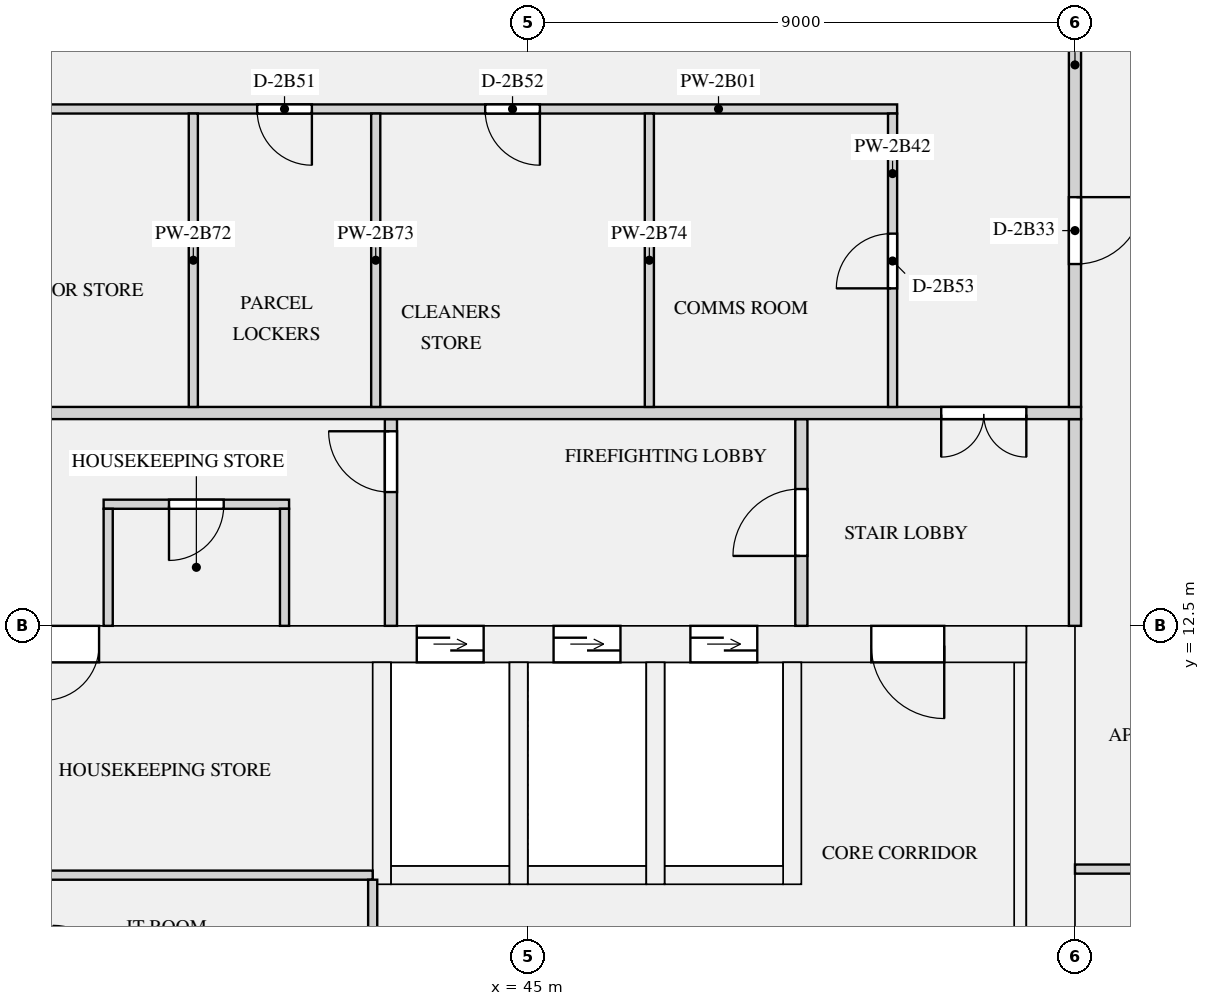
"""IFC4 building model, lengths in metres.
Left out: names, types, materials, properties, quantities, classifications, styles, units other than length and angle.
Written with IfcOpenShell. Run it as: python <this file> out.ifc"""

import sys

from ifc_helpers import new_model, si_unit, direction, frame, frame_2d, origin, place, context, subcontext, project, spatial, rectangle, extrude, element, fill, save


model = new_model("IFC4")
c1 = context("Model", 3, precision=1e-05, world=origin(), true_north=direction((0.0, 1.0)))
c2 = subcontext(c1, "Body", "Model", "MODEL_VIEW")
j1 = project(units=[si_unit("LENGTHUNIT", "METRE"), si_unit("PLANEANGLEUNIT", "RADIAN")], contexts=[c1])
p1 = place(None, origin())
s1 = spatial("IfcSite", under=j1, at=p1, CompositionType="ELEMENT")
p2 = place(p1, origin())
s2 = spatial("IfcBuilding", under=s1, at=p2, CompositionType="ELEMENT")
p3 = place(p2, frame((0.0, 0.0, 93.0)))
s3 = spatial("IfcBuildingStorey", under=s2, at=p3, CompositionType="ELEMENT", Elevation=93.0)
p4 = place(p3, frame((53.6, 0.0, 0.0), z_axis=(0.0, 0.0, 1.0), x_axis=(0.0, 1.0, 0.0)))
e1 = element("IfcWall", 1, at=p4, inside=s3, PredefinedType="SHEAR", context=c2, shape_type="SweptSolid", body=[
    extrude(rectangle(XDim=12.5, YDim=0.8, at=frame_2d((6.25, 0.0))), origin(), (0.0, 0.0, 1.0), 3.15),
])
p5 = place(p3, frame((18.8, 12.2, 0.0), z_axis=(0.0, 0.0, 1.0), x_axis=(1.0, 0.0, 0.0)))
e2 = element("IfcWall", 2, at=p5, inside=s3, PredefinedType="SHEAR", context=c2, shape_type="SweptSolid", body=[
    extrude(rectangle(XDim=34.4, YDim=0.6, at=frame_2d((17.2, 0.0))), origin(), (0.0, 0.0, 1.0), 3.15),
])
p6 = place(p5, frame((24.375, 0.0, 0.0)))
e3 = element("IfcOpeningElement", 3, at=p6, cuts=e2, PredefinedType="OPENING", context=c2, shape_type="SweptSolid", body=[
    extrude(rectangle(XDim=1.1, YDim=2.1, at=frame_2d((0.55, 1.05))), frame((0.0, 0.31, 0.0), z_axis=(0.0, -1.0, 0.0), x_axis=(1.0, 0.0, 0.0)), (0.0, 0.0, 1.0), 0.62),
])
p7 = place(p5, frame((26.625, 0.0, 0.0)))
e4 = element("IfcOpeningElement", 4, at=p7, cuts=e2, PredefinedType="OPENING", context=c2, shape_type="SweptSolid", body=[
    extrude(rectangle(XDim=1.1, YDim=2.1, at=frame_2d((0.55, 1.05))), frame((0.0, 0.31, 0.0), z_axis=(0.0, -1.0, 0.0), x_axis=(1.0, 0.0, 0.0)), (0.0, 0.0, 1.0), 0.62),
])
p8 = place(p5, frame((28.875, 0.0, 0.0)))
e5 = element("IfcOpeningElement", 5, at=p8, cuts=e2, PredefinedType="OPENING", context=c2, shape_type="SweptSolid", body=[
    extrude(rectangle(XDim=1.1, YDim=2.1, at=frame_2d((0.55, 1.05))), frame((0.0, 0.31, 0.0), z_axis=(0.0, -1.0, 0.0), x_axis=(1.0, 0.0, 0.0)), (0.0, 0.0, 1.0), 0.62),
])
p9 = place(p5, frame((4.75, 0.0, 0.0)))
e6 = element("IfcOpeningElement", 6, at=p9, cuts=e2, PredefinedType="OPENING", context=c2, shape_type="SweptSolid", body=[
    extrude(rectangle(XDim=0.9, YDim=2.1, at=frame_2d((0.45, 1.05))), frame((0.0, 0.31, 0.0), z_axis=(0.0, -1.0, 0.0), x_axis=(1.0, 0.0, 0.0)), (0.0, 0.0, 1.0), 0.62),
])
p10 = place(p5, frame((18.25, 0.0, 0.0)))
e7 = element("IfcOpeningElement", 7, at=p10, cuts=e2, PredefinedType="OPENING", context=c2, shape_type="SweptSolid", body=[
    extrude(rectangle(XDim=0.9, YDim=2.1, at=frame_2d((0.45, 1.05))), frame((0.0, 0.31, 0.0), z_axis=(0.0, -1.0, 0.0), x_axis=(1.0, 0.0, 0.0)), (0.0, 0.0, 1.0), 0.62),
])
p11 = place(p5, frame((1.35, 0.0, 0.0)))
e8 = element("IfcOpeningElement", 8, at=p11, cuts=e2, PredefinedType="OPENING", context=c2, shape_type="SweptSolid", body=[
    extrude(rectangle(XDim=1.2, YDim=2.1, at=frame_2d((0.6, 1.05))), frame((0.0, 0.31, 0.0), z_axis=(0.0, -1.0, 0.0), x_axis=(1.0, 0.0, 0.0)), (0.0, 0.0, 1.0), 0.62),
])
p12 = place(p5, frame((31.85, 0.0, 0.0)))
e9 = element("IfcOpeningElement", 9, at=p12, cuts=e2, PredefinedType="OPENING", context=c2, shape_type="SweptSolid", body=[
    extrude(rectangle(XDim=1.2, YDim=2.1, at=frame_2d((0.6, 1.05))), frame((0.0, 0.31, 0.0), z_axis=(0.0, -1.0, 0.0), x_axis=(1.0, 0.0, 0.0)), (0.0, 0.0, 1.0), 0.62),
])
p13 = place(p3, frame((53.1, 1.0, 0.0), z_axis=(0.0, 0.0, 1.0), x_axis=(0.0, 1.0, 0.0)))
e10 = element("IfcWall", 10, at=p13, inside=s3, PredefinedType="SHEAR", context=c2, shape_type="SweptSolid", body=[
    extrude(rectangle(XDim=10.9, YDim=0.2, at=frame_2d((5.45, 0.0))), origin(), (0.0, 0.0, 1.0), 3.15),
])
p14 = place(p3, frame((42.75, 8.4, 0.0), z_axis=(0.0, 0.0, 1.0), x_axis=(1.0, 0.0, 0.0)))
e11 = element("IfcWall", 11, at=p14, inside=s3, PredefinedType="SHEAR", context=c2, shape_type="SweptSolid", body=[
    extrude(rectangle(XDim=1.95, YDim=0.3, at=frame_2d((0.975, 0.0))), origin(), (0.0, 0.0, 1.0), 3.15),
])
p15 = place(p3, frame((42.6, 8.25, 0.0), z_axis=(0.0, 0.0, 1.0), x_axis=(0.0, 1.0, 0.0)))
e12 = element("IfcWall", 12, at=p15, inside=s3, PredefinedType="SHEAR", context=c2, shape_type="SweptSolid", body=[
    extrude(rectangle(XDim=3.65, YDim=0.3, at=frame_2d((1.825, 0.0))), origin(), (0.0, 0.0, 1.0), 3.15),
])
p16 = place(p3, frame((45.0, 8.4, 0.0), z_axis=(0.0, 0.0, 1.0), x_axis=(1.0, 0.0, 0.0)))
e13 = element("IfcWall", 13, at=p16, inside=s3, PredefinedType="SHEAR", context=c2, shape_type="SweptSolid", body=[
    extrude(rectangle(XDim=1.95, YDim=0.3, at=frame_2d((0.975, 0.0))), origin(), (0.0, 0.0, 1.0), 3.15),
])
p17 = place(p3, frame((44.85, 8.25, 0.0), z_axis=(0.0, 0.0, 1.0), x_axis=(0.0, 1.0, 0.0)))
e14 = element("IfcWall", 14, at=p17, inside=s3, PredefinedType="SHEAR", context=c2, shape_type="SweptSolid", body=[
    extrude(rectangle(XDim=3.65, YDim=0.3, at=frame_2d((1.825, 0.0))), origin(), (0.0, 0.0, 1.0), 3.15),
])
p18 = place(p3, frame((47.25, 8.4, 0.0), z_axis=(0.0, 0.0, 1.0), x_axis=(1.0, 0.0, 0.0)))
e15 = element("IfcWall", 15, at=p18, inside=s3, PredefinedType="SHEAR", context=c2, shape_type="SweptSolid", body=[
    extrude(rectangle(XDim=1.95, YDim=0.3, at=frame_2d((0.975, 0.0))), origin(), (0.0, 0.0, 1.0), 3.15),
])
for number, where, z_axis, x_axis in (
    (16, (47.1, 8.25, 0.0), (0.0, 0.0, 1.0), (0.0, 1.0, 0.0)),
    (17, (49.35, 8.25, 0.0), (0.0, 0.0, 1.0), (0.0, 1.0, 0.0)),
):
    element("IfcWall", number, at=place(p3, frame(where, z_axis=z_axis, x_axis=x_axis)), inside=s3, PredefinedType="SHEAR", context=c2, shape_type="SweptSolid", body=[
        extrude(rectangle(XDim=3.65, YDim=0.3, at=frame_2d((1.825, 0.0))), origin(), (0.0, 0.0, 1.0), 3.15),
    ])
p19 = place(p3, frame((36.675, 8.4, 0.0), z_axis=(0.0, 0.0, 1.0), x_axis=(1.0, 0.0, 0.0)))
e18 = element("IfcWall", 18, at=p19, inside=s3, PredefinedType="PARTITIONING", context=c2, shape_type="SweptSolid", body=[
    extrude(rectangle(XDim=5.775, YDim=0.15, at=frame_2d((2.887, 0.0))), origin(), (0.0, 0.0, 1.0), 2.83),
])
p20 = place(p3, frame((38.025, 14.5, 0.0), z_axis=(0.0, 0.0, 1.0), x_axis=(1.0, 0.0, 0.0)))
e19 = element("IfcWall", 19, at=p20, inside=s3, PredefinedType="PARTITIONING", context=c2, shape_type="SweptSolid", body=[
    extrude(rectangle(XDim=3.05, YDim=0.15, at=frame_2d((1.525, 0.0))), origin(), (0.0, 0.0, 1.0), 2.83),
])
p21 = place(p20, frame((1.075, 0.0, 0.0)))
e20 = element("IfcOpeningElement", 20, at=p21, cuts=e19, PredefinedType="OPENING", context=c2, shape_type="SweptSolid", body=[
    extrude(rectangle(XDim=0.9, YDim=2.1, at=frame_2d((0.45, 1.05))), frame((0.0, 0.085, 0.0), z_axis=(0.0, -1.0, 0.0), x_axis=(1.0, 0.0, 0.0)), (0.0, 0.0, 1.0), 0.17),
])
p22 = place(p3, frame((42.45, 6.65, 0.0), z_axis=(0.0, 0.0, 1.0), x_axis=(0.0, 1.0, 0.0)))
e21 = element("IfcWall", 21, at=p22, inside=s3, PredefinedType="PARTITIONING", context=c2, shape_type="SweptSolid", body=[
    extrude(rectangle(XDim=1.675, YDim=0.15, at=frame_2d((0.837, 0.0))), origin(), (0.0, 0.0, 1.0), 2.83),
])
for number, where, z_axis, x_axis in (
    (22, (38.1, 12.5, 0.0), (0.0, 0.0, 1.0), (0.0, 1.0, 0.0)),
    (23, (41.0, 12.5, 0.0), (0.0, 0.0, 1.0), (0.0, 1.0, 0.0)),
):
    element("IfcWall", number, at=place(p3, frame(where, z_axis=z_axis, x_axis=x_axis)), inside=s3, PredefinedType="PARTITIONING", context=c2, shape_type="SweptSolid", body=[
        extrude(rectangle(XDim=1.925, YDim=0.15, at=frame_2d((0.962, 0.0))), origin(), (0.0, 0.0, 1.0), 2.83),
    ])
p23 = place(p3, frame((42.75, 12.5, 0.0), z_axis=(0.0, 0.0, 1.0), x_axis=(0.0, 1.0, 0.0)))
e24 = element("IfcWall", 24, at=p23, inside=s3, PredefinedType="PARTITIONING", context=c2, shape_type="SweptSolid", body=[
    extrude(rectangle(XDim=3.4, YDim=0.2, at=frame_2d((1.7, 0.0))), origin(), (0.0, 0.0, 1.0), 2.83),
])
p24 = place(p23, frame((2.2, 0.0, 0.0)))
e25 = element("IfcOpeningElement", 25, at=p24, cuts=e24, PredefinedType="OPENING", context=c2, shape_type="SweptSolid", body=[
    extrude(rectangle(XDim=1.0, YDim=2.1, at=frame_2d((0.5, 1.05))), frame((0.0, 0.11, 0.0), z_axis=(0.0, -1.0, 0.0), x_axis=(1.0, 0.0, 0.0)), (0.0, 0.0, 1.0), 0.22),
])
p25 = place(p3, frame((49.5, 12.5, 0.0), z_axis=(0.0, 0.0, 1.0), x_axis=(0.0, 1.0, 0.0)))
e26 = element("IfcWall", 26, at=p25, inside=s3, PredefinedType="PARTITIONING", context=c2, shape_type="SweptSolid", body=[
    extrude(rectangle(XDim=3.4, YDim=0.2, at=frame_2d((1.7, 0.0))), origin(), (0.0, 0.0, 1.0), 2.83),
])
p26 = place(p25, frame((1.15, 0.0, 0.0)))
e27 = element("IfcOpeningElement", 27, at=p26, cuts=e26, PredefinedType="OPENING", context=c2, shape_type="SweptSolid", body=[
    extrude(rectangle(XDim=1.1, YDim=2.1, at=frame_2d((0.55, 1.05))), frame((0.0, 0.11, 0.0), z_axis=(0.0, -1.0, 0.0), x_axis=(1.0, 0.0, 0.0)), (0.0, 0.0, 1.0), 0.22),
])
p27 = place(p3, frame((54.0, 12.5, 0.0), z_axis=(0.0, 0.0, 1.0), x_axis=(0.0, 1.0, 0.0)))
e28 = element("IfcWall", 28, at=p27, inside=s3, PredefinedType="PARTITIONING", context=c2, shape_type="SweptSolid", body=[
    extrude(rectangle(XDim=3.4, YDim=0.2, at=frame_2d((1.7, 0.0))), origin(), (0.0, 0.0, 1.0), 2.83),
])
p28 = place(p3, frame((20.925, 21.0, 0.0), z_axis=(0.0, 0.0, 1.0), x_axis=(1.0, 0.0, 0.0)))
e29 = element("IfcWall", 29, at=p28, inside=s3, PredefinedType="PARTITIONING", context=c2, shape_type="SweptSolid", body=[
    extrude(rectangle(XDim=30.15, YDim=0.15, at=frame_2d((15.075, 0.0))), origin(), (0.0, 0.0, 1.0), 2.83),
])
p29 = place(p28, frame((2.125, 0.0, 0.0)))
e30 = element("IfcOpeningElement", 30, at=p29, cuts=e29, PredefinedType="OPENING", context=c2, shape_type="SweptSolid", body=[
    extrude(rectangle(XDim=0.9, YDim=2.1, at=frame_2d((0.45, 1.05))), frame((0.0, 0.085, 0.0), z_axis=(0.0, -1.0, 0.0), x_axis=(1.0, 0.0, 0.0)), (0.0, 0.0, 1.0), 0.17),
])
p30 = place(p28, frame((6.375, 0.0, 0.0)))
e31 = element("IfcOpeningElement", 31, at=p30, cuts=e29, PredefinedType="OPENING", context=c2, shape_type="SweptSolid", body=[
    extrude(rectangle(XDim=0.9, YDim=2.1, at=frame_2d((0.45, 1.05))), frame((0.0, 0.085, 0.0), z_axis=(0.0, -1.0, 0.0), x_axis=(1.0, 0.0, 0.0)), (0.0, 0.0, 1.0), 0.17),
])
p31 = place(p28, frame((10.125, 0.0, 0.0)))
e32 = element("IfcOpeningElement", 32, at=p31, cuts=e29, PredefinedType="OPENING", context=c2, shape_type="SweptSolid", body=[
    extrude(rectangle(XDim=0.9, YDim=2.1, at=frame_2d((0.45, 1.05))), frame((0.0, 0.085, 0.0), z_axis=(0.0, -1.0, 0.0), x_axis=(1.0, 0.0, 0.0)), (0.0, 0.0, 1.0), 0.17),
])
p32 = place(p28, frame((15.125, 0.0, 0.0)))
e33 = element("IfcOpeningElement", 33, at=p32, cuts=e29, PredefinedType="OPENING", context=c2, shape_type="SweptSolid", body=[
    extrude(rectangle(XDim=0.9, YDim=2.1, at=frame_2d((0.45, 1.05))), frame((0.0, 0.085, 0.0), z_axis=(0.0, -1.0, 0.0), x_axis=(1.0, 0.0, 0.0)), (0.0, 0.0, 1.0), 0.17),
])
p33 = place(p28, frame((19.625, 0.0, 0.0)))
e34 = element("IfcOpeningElement", 34, at=p33, cuts=e29, PredefinedType="OPENING", context=c2, shape_type="SweptSolid", body=[
    extrude(rectangle(XDim=0.9, YDim=2.1, at=frame_2d((0.45, 1.05))), frame((0.0, 0.085, 0.0), z_axis=(0.0, -1.0, 0.0), x_axis=(1.0, 0.0, 0.0)), (0.0, 0.0, 1.0), 0.17),
])
p34 = place(p28, frame((23.375, 0.0, 0.0)))
e35 = element("IfcOpeningElement", 35, at=p34, cuts=e29, PredefinedType="OPENING", context=c2, shape_type="SweptSolid", body=[
    extrude(rectangle(XDim=0.9, YDim=2.1, at=frame_2d((0.45, 1.05))), frame((0.0, 0.085, 0.0), z_axis=(0.0, -1.0, 0.0), x_axis=(1.0, 0.0, 0.0)), (0.0, 0.0, 1.0), 0.17),
])
p35 = place(p3, frame((54.0, 8.5, 0.0), z_axis=(0.0, 0.0, 1.0), x_axis=(1.0, 0.0, 0.0)))
e36 = element("IfcWall", 36, at=p35, inside=s3, PredefinedType="PARTITIONING", context=c2, shape_type="SweptSolid", body=[
    extrude(rectangle(XDim=8.925, YDim=0.15, at=frame_2d((4.462, 0.0))), origin(), (0.0, 0.0, 1.0), 2.83),
])
p36 = place(p35, frame((1.8, 0.0, 0.0)))
e37 = element("IfcOpeningElement", 37, at=p36, cuts=e36, PredefinedType="OPENING", context=c2, shape_type="SweptSolid", body=[
    extrude(rectangle(XDim=0.9, YDim=2.1, at=frame_2d((0.45, 1.05))), frame((0.0, 0.085, 0.0), z_axis=(0.0, -1.0, 0.0), x_axis=(1.0, 0.0, 0.0)), (0.0, 0.0, 1.0), 0.17),
])
p37 = place(p35, frame((6.3, 0.0, 0.0)))
e38 = element("IfcOpeningElement", 38, at=p37, cuts=e36, PredefinedType="OPENING", context=c2, shape_type="SweptSolid", body=[
    extrude(rectangle(XDim=0.9, YDim=2.1, at=frame_2d((0.45, 1.05))), frame((0.0, 0.085, 0.0), z_axis=(0.0, -1.0, 0.0), x_axis=(1.0, 0.0, 0.0)), (0.0, 0.0, 1.0), 0.17),
])
p38 = place(p3, frame((17.9, 16.0, 0.0), z_axis=(0.0, 0.0, 1.0), x_axis=(1.0, 0.0, 0.0)))
e39 = element("IfcWall", 39, at=p38, inside=s3, PredefinedType="PARTITIONING", context=c2, shape_type="SweptSolid", body=[
    extrude(rectangle(XDim=36.2, YDim=0.2, at=frame_2d((18.1, 0.0))), origin(), (0.0, 0.0, 1.0), 2.83),
])
p39 = place(p38, frame((0.9, 0.0, 0.0)))
e40 = element("IfcOpeningElement", 40, at=p39, cuts=e39, PredefinedType="OPENING", context=c2, shape_type="SweptSolid", body=[
    extrude(rectangle(XDim=1.4, YDim=2.1, at=frame_2d((0.7, 1.05))), frame((0.0, 0.11, 0.0), z_axis=(0.0, -1.0, 0.0), x_axis=(1.0, 0.0, 0.0)), (0.0, 0.0, 1.0), 0.22),
])
p40 = place(p38, frame((33.9, 0.0, 0.0)))
e41 = element("IfcOpeningElement", 41, at=p40, cuts=e39, PredefinedType="OPENING", context=c2, shape_type="SweptSolid", body=[
    extrude(rectangle(XDim=1.4, YDim=2.1, at=frame_2d((0.7, 1.05))), frame((0.0, 0.11, 0.0), z_axis=(0.0, -1.0, 0.0), x_axis=(1.0, 0.0, 0.0)), (0.0, 0.0, 1.0), 0.22),
])
p41 = place(p3, frame((54.0, 16.1, 0.0), z_axis=(0.0, 0.0, 1.0), x_axis=(0.0, 1.0, 0.0)))
e42 = element("IfcWall", 42, at=p41, inside=s3, PredefinedType="PARTITIONING", context=c2, shape_type="SweptSolid", body=[
    extrude(rectangle(XDim=7.8, YDim=0.2, at=frame_2d((3.9, 0.0))), origin(), (0.0, 0.0, 1.0), 2.83),
])
p42 = place(p41, frame((2.35, 0.0, 0.0)))
e43 = element("IfcOpeningElement", 43, at=p42, cuts=e42, PredefinedType="OPENING", context=c2, shape_type="SweptSolid", body=[
    extrude(rectangle(XDim=1.1, YDim=2.1, at=frame_2d((0.55, 1.05))), frame((0.0, 0.11, 0.0), z_axis=(0.0, -1.0, 0.0), x_axis=(1.0, 0.0, 0.0)), (0.0, 0.0, 1.0), 0.22),
])
p43 = place(p3, frame((51.0, 16.1, 0.0), z_axis=(0.0, 0.0, 1.0), x_axis=(0.0, 1.0, 0.0)))
e44 = element("IfcWall", 44, at=p43, inside=s3, PredefinedType="PARTITIONING", context=c2, shape_type="SweptSolid", body=[
    extrude(rectangle(XDim=4.825, YDim=0.15, at=frame_2d((2.413, 0.0))), origin(), (0.0, 0.0, 1.0), 2.83),
])
p44 = place(p43, frame((1.95, 0.0, 0.0)))
e45 = element("IfcOpeningElement", 45, at=p44, cuts=e44, PredefinedType="OPENING", context=c2, shape_type="SweptSolid", body=[
    extrude(rectangle(XDim=0.9, YDim=2.1, at=frame_2d((0.45, 1.05))), frame((0.0, 0.085, 0.0), z_axis=(0.0, -1.0, 0.0), x_axis=(1.0, 0.0, 0.0)), (0.0, 0.0, 1.0), 0.17),
])
for number, where, z_axis, x_axis in (
    (46, (39.5, 16.1, 0.0), (0.0, 0.0, 1.0), (0.0, 1.0, 0.0)),
    (47, (42.5, 16.1, 0.0), (0.0, 0.0, 1.0), (0.0, 1.0, 0.0)),
    (48, (47.0, 16.1, 0.0), (0.0, 0.0, 1.0), (0.0, 1.0, 0.0)),
):
    element("IfcWall", number, at=place(p3, frame(where, z_axis=z_axis, x_axis=x_axis)), inside=s3, PredefinedType="PARTITIONING", context=c2, shape_type="SweptSolid", body=[
        extrude(rectangle(XDim=4.825, YDim=0.15, at=frame_2d((2.413, 0.0))), origin(), (0.0, 0.0, 1.0), 2.83),
    ])
p45 = place(p6, origin())
e49 = element("IfcDoor", 49, at=p45, inside=s3, OperationType="DOUBLE_DOOR_SLIDING", PredefinedType="DOOR", context=c2, shape_type="SweptSolid", body=[
    extrude(rectangle(XDim=1.1, YDim=2.1, at=frame_2d((0.55, 1.05))), frame((0.0, 0.025, 0.0), z_axis=(0.0, -1.0, 0.0), x_axis=(1.0, 0.0, 0.0)), (0.0, 0.0, 1.0), 0.05),
])
fill(e3, e49)
p46 = place(p7, origin())
e50 = element("IfcDoor", 50, at=p46, inside=s3, OperationType="DOUBLE_DOOR_SLIDING", PredefinedType="DOOR", context=c2, shape_type="SweptSolid", body=[
    extrude(rectangle(XDim=1.1, YDim=2.1, at=frame_2d((0.55, 1.05))), frame((0.0, 0.025, 0.0), z_axis=(0.0, -1.0, 0.0), x_axis=(1.0, 0.0, 0.0)), (0.0, 0.0, 1.0), 0.05),
])
fill(e4, e50)
p47 = place(p8, origin())
e51 = element("IfcDoor", 51, at=p47, inside=s3, OperationType="DOUBLE_DOOR_SLIDING", PredefinedType="DOOR", context=c2, shape_type="SweptSolid", body=[
    extrude(rectangle(XDim=1.1, YDim=2.1, at=frame_2d((0.55, 1.05))), frame((0.0, 0.025, 0.0), z_axis=(0.0, -1.0, 0.0), x_axis=(1.0, 0.0, 0.0)), (0.0, 0.0, 1.0), 0.05),
])
fill(e5, e51)
p48 = place(p21, frame((0.9, 0.0, 0.0), z_axis=(0.0, 0.0, 1.0), x_axis=(-1.0, 0.0, 0.0)))
e52 = element("IfcDoor", 52, at=p48, inside=s3, OperationType="SINGLE_SWING_RIGHT", PredefinedType="DOOR", context=c2, shape_type="SweptSolid", body=[
    extrude(rectangle(XDim=0.9, YDim=2.1, at=frame_2d((0.45, 1.05))), frame((0.0, 0.025, 0.0), z_axis=(0.0, -1.0, 0.0), x_axis=(1.0, 0.0, 0.0)), (0.0, 0.0, 1.0), 0.05),
])
fill(e20, e52)
p49 = place(p10, frame((0.9, 0.0, 0.0), z_axis=(0.0, 0.0, 1.0), x_axis=(-1.0, 0.0, 0.0)))
e53 = element("IfcDoor", 53, at=p49, inside=s3, OperationType="SINGLE_SWING_RIGHT", PredefinedType="DOOR", context=c2, shape_type="SweptSolid", body=[
    extrude(rectangle(XDim=0.9, YDim=2.1, at=frame_2d((0.45, 1.05))), frame((0.0, 0.025, 0.0), z_axis=(0.0, -1.0, 0.0), x_axis=(1.0, 0.0, 0.0)), (0.0, 0.0, 1.0), 0.05),
])
fill(e7, e53)
p50 = place(p12, frame((1.2, 0.0, 0.0), z_axis=(0.0, 0.0, 1.0), x_axis=(-1.0, 0.0, 0.0)))
e54 = element("IfcDoor", 54, at=p50, inside=s3, OperationType="SINGLE_SWING_LEFT", PredefinedType="DOOR", context=c2, shape_type="SweptSolid", body=[
    extrude(rectangle(XDim=1.2, YDim=2.1, at=frame_2d((0.6, 1.05))), frame((0.0, 0.025, 0.0), z_axis=(0.0, -1.0, 0.0), x_axis=(1.0, 0.0, 0.0)), (0.0, 0.0, 1.0), 0.05),
])
fill(e9, e54)
p51 = place(p24, origin())
e55 = element("IfcDoor", 55, at=p51, inside=s3, OperationType="SINGLE_SWING_RIGHT", PredefinedType="DOOR", context=c2, shape_type="SweptSolid", body=[
    extrude(rectangle(XDim=1.0, YDim=2.1, at=frame_2d((0.5, 1.05))), frame((0.0, 0.025, 0.0), z_axis=(0.0, -1.0, 0.0), x_axis=(1.0, 0.0, 0.0)), (0.0, 0.0, 1.0), 0.05),
])
fill(e25, e55)
p52 = place(p26, origin())
e56 = element("IfcDoor", 56, at=p52, inside=s3, OperationType="SINGLE_SWING_LEFT", PredefinedType="DOOR", context=c2, shape_type="SweptSolid", body=[
    extrude(rectangle(XDim=1.1, YDim=2.1, at=frame_2d((0.55, 1.05))), frame((0.0, 0.025, 0.0), z_axis=(0.0, -1.0, 0.0), x_axis=(1.0, 0.0, 0.0)), (0.0, 0.0, 1.0), 0.05),
])
fill(e27, e56)
p53 = place(p40, frame((1.4, 0.0, 0.0), z_axis=(0.0, 0.0, 1.0), x_axis=(-1.0, 0.0, 0.0)))
e57 = element("IfcDoor", 57, at=p53, inside=s3, OperationType="DOUBLE_DOOR_SINGLE_SWING", PredefinedType="DOOR", context=c2, shape_type="SweptSolid", body=[
    extrude(rectangle(XDim=1.4, YDim=2.1, at=frame_2d((0.7, 1.05))), frame((0.0, 0.025, 0.0), z_axis=(0.0, -1.0, 0.0), x_axis=(1.0, 0.0, 0.0)), (0.0, 0.0, 1.0), 0.05),
])
fill(e41, e57)
p54 = place(p42, frame((1.1, 0.0, 0.0), z_axis=(0.0, 0.0, 1.0), x_axis=(-1.0, 0.0, 0.0)))
e58 = element("IfcDoor", 58, at=p54, inside=s3, OperationType="SINGLE_SWING_LEFT", PredefinedType="DOOR", context=c2, shape_type="SweptSolid", body=[
    extrude(rectangle(XDim=1.1, YDim=2.1, at=frame_2d((0.55, 1.05))), frame((0.0, 0.025, 0.0), z_axis=(0.0, -1.0, 0.0), x_axis=(1.0, 0.0, 0.0)), (0.0, 0.0, 1.0), 0.05),
])
fill(e43, e58)
p55 = place(p33, frame((0.9, 0.0, 0.0), z_axis=(0.0, 0.0, 1.0), x_axis=(-1.0, 0.0, 0.0)))
e59 = element("IfcDoor", 59, at=p55, inside=s3, OperationType="SINGLE_SWING_LEFT", PredefinedType="DOOR", context=c2, shape_type="SweptSolid", body=[
    extrude(rectangle(XDim=0.9, YDim=2.1, at=frame_2d((0.45, 1.05))), frame((0.0, 0.025, 0.0), z_axis=(0.0, -1.0, 0.0), x_axis=(1.0, 0.0, 0.0)), (0.0, 0.0, 1.0), 0.05),
])
fill(e34, e59)
p56 = place(p34, frame((0.9, 0.0, 0.0), z_axis=(0.0, 0.0, 1.0), x_axis=(-1.0, 0.0, 0.0)))
e60 = element("IfcDoor", 60, at=p56, inside=s3, OperationType="SINGLE_SWING_LEFT", PredefinedType="DOOR", context=c2, shape_type="SweptSolid", body=[
    extrude(rectangle(XDim=0.9, YDim=2.1, at=frame_2d((0.45, 1.05))), frame((0.0, 0.025, 0.0), z_axis=(0.0, -1.0, 0.0), x_axis=(1.0, 0.0, 0.0)), (0.0, 0.0, 1.0), 0.05),
])
fill(e35, e60)
p57 = place(p44, origin())
e61 = element("IfcDoor", 61, at=p57, inside=s3, OperationType="SINGLE_SWING_LEFT", PredefinedType="DOOR", context=c2, shape_type="SweptSolid", body=[
    extrude(rectangle(XDim=0.9, YDim=2.1, at=frame_2d((0.45, 1.05))), frame((0.0, 0.025, 0.0), z_axis=(0.0, -1.0, 0.0), x_axis=(1.0, 0.0, 0.0)), (0.0, 0.0, 1.0), 0.05),
])
fill(e45, e61)
save(model, sys.argv[1])
